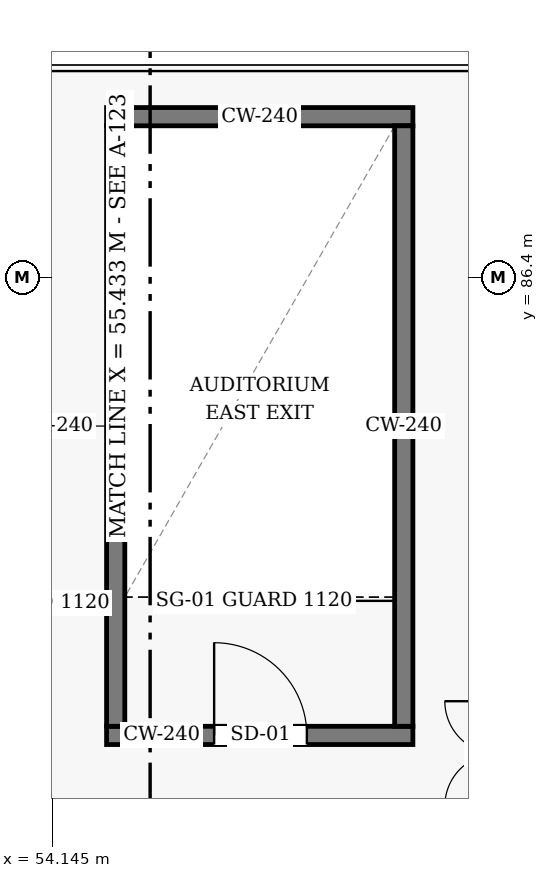
"""IFC4 building model, lengths in metres.
Left out: names, types, materials, properties, quantities, classifications, styles, units other than length and angle.
Written with IfcOpenShell. Run it as: python <this file> out.ifc"""

import sys

from ifc_helpers import new_model, si_unit, direction, frame, frame_2d, origin, place, context, subcontext, project, spatial, rectangle, extrude, element, fill, save


model = new_model("IFC4")
c1 = context("Model", 3, precision=1e-05, world=origin(), true_north=direction((0.0, 1.0)))
c2 = subcontext(c1, "Body", "Model", "MODEL_VIEW")
j1 = project(units=[si_unit("LENGTHUNIT", "METRE"), si_unit("PLANEANGLEUNIT", "RADIAN")], contexts=[c1])
p1 = place(None, origin())
s1 = spatial("IfcSite", under=j1, at=p1, CompositionType="ELEMENT")
p2 = place(p1, origin())
s2 = spatial("IfcBuilding", under=s1, at=p2, CompositionType="ELEMENT")
p3 = place(p2, frame((0.0, 0.0, 4.8)))
s3 = spatial("IfcBuildingStorey", under=s2, at=p3, CompositionType="ELEMENT", Elevation=4.8)
p4 = place(p3, frame((54.86, 80.38, 0.0), z_axis=(0.0, 0.0, 1.0), x_axis=(1.0, 0.0, 0.0)))
e1 = element("IfcWall", 1, at=p4, inside=s3, PredefinedType="SHEAR", context=c2, shape_type="SweptSolid", body=[
    extrude(rectangle(XDim=4.03, YDim=0.24, at=frame_2d((2.015, 0.0))), origin(), (0.0, 0.0, 1.0), 3.955),
])
p5 = place(p4, frame((1.415, 0.0, 0.0)))
e2 = element("IfcOpeningElement", 2, at=p5, cuts=e1, PredefinedType="OPENING", context=c2, shape_type="SweptSolid", body=[
    extrude(rectangle(XDim=1.22, YDim=2.18, at=frame_2d((0.61, 1.09))), frame((0.0, 0.13, 0.0), z_axis=(0.0, -1.0, 0.0), x_axis=(1.0, 0.0, 0.0)), (0.0, 0.0, 1.0), 0.26),
])
p6 = place(p3, frame((54.86, 88.52, 0.0), z_axis=(0.0, 0.0, 1.0), x_axis=(1.0, 0.0, 0.0)))
e3 = element("IfcWall", 3, at=p6, inside=s3, PredefinedType="SHEAR", context=c2, shape_type="SweptSolid", body=[
    extrude(rectangle(XDim=4.03, YDim=0.24, at=frame_2d((2.015, 0.0))), origin(), (0.0, 0.0, 1.0), 3.955),
])
for number, where, z_axis, x_axis in (
    (4, (54.98, 80.5, 0.0), (0.0, 0.0, 1.0), (0.0, 1.0, 0.0)),
    (5, (58.77, 80.5, 0.0), (0.0, 0.0, 1.0), (0.0, 1.0, 0.0)),
):
    element("IfcWall", number, at=place(p3, frame(where, z_axis=z_axis, x_axis=x_axis)), inside=s3, PredefinedType="SHEAR", context=c2, shape_type="SweptSolid", body=[
        extrude(rectangle(XDim=7.9, YDim=0.24, at=frame_2d((3.95, 0.0))), origin(), (0.0, 0.0, 1.0), 3.955),
    ])
p7 = place(p5, origin())
e6 = element("IfcDoor", 6, at=p7, inside=s3, OperationType="SINGLE_SWING_LEFT", PredefinedType="DOOR", context=c2, shape_type="SweptSolid", body=[
    extrude(rectangle(XDim=1.22, YDim=2.18, at=frame_2d((0.61, 1.09))), frame((0.0, 0.025, 0.0), z_axis=(0.0, -1.0, 0.0), x_axis=(1.0, 0.0, 0.0)), (0.0, 0.0, 1.0), 0.05),
])
fill(e2, e6)
save(model, sys.argv[1])
